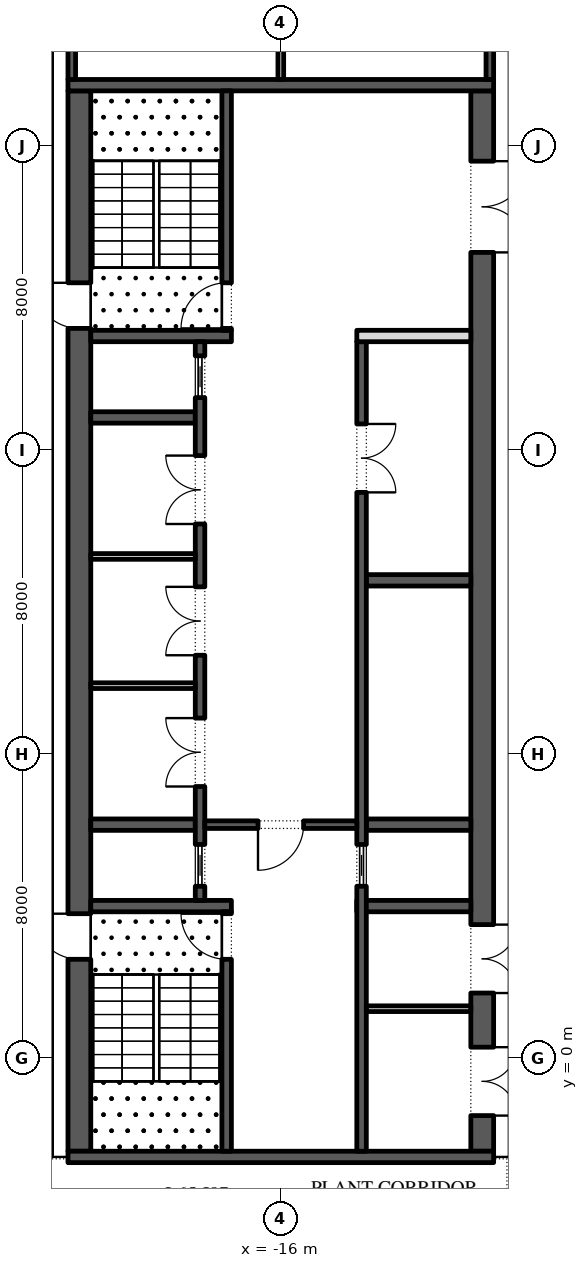
"""IFC4 building model, lengths in metres.
Left out: names, types, materials, properties, quantities, classifications, styles, units other than length and angle.
Written with IfcOpenShell. Run it as: python <this file> out.ifc"""

import sys

from ifc_helpers import new_model, si_unit, direction, frame, frame_2d, origin, place, context, subcontext, project, spatial, rectangle, extrude, element, fill, save


model = new_model("IFC4")
c1 = context("Model", 3, precision=1e-05, world=origin(), true_north=direction((0.0, 1.0)))
c2 = subcontext(c1, "Body", "Model", "MODEL_VIEW")
j1 = project(units=[si_unit("LENGTHUNIT", "METRE"), si_unit("PLANEANGLEUNIT", "RADIAN")], contexts=[c1])
p1 = place(None, origin())
s1 = spatial("IfcSite", under=j1, at=p1, CompositionType="ELEMENT")
p2 = place(p1, origin())
s2 = spatial("IfcBuilding", under=s1, at=p2, CompositionType="ELEMENT")
p3 = place(p2, frame((0.0, 0.0, 297.6)))
s3 = spatial("IfcBuildingStorey", under=s2, at=p3, CompositionType="ELEMENT", Elevation=297.6)
p4 = place(p3, frame((-21.359, 48.678, 0.0), z_axis=(0.0, 0.0, 1.0), x_axis=(-0.224949219336, -0.974370488428, 0.0)))
e1 = element("IfcWall", 1, at=p4, inside=s3, PredefinedType="STANDARD", context=c2, shape_type="SweptSolid", body=[
    extrude(rectangle(XDim=30.011, YDim=0.3, at=frame_2d((15.006, 0.0))), origin(), (0.0, 0.0, 1.0), 4.95),
])
p5 = place(p4, frame((1.607, 0.0, 0.6)))
e2 = element("IfcOpeningElement", 2, at=p5, cuts=e1, PredefinedType="OPENING", context=c2, shape_type="SweptSolid", body=[
    extrude(rectangle(XDim=3.6, YDim=3.9, at=frame_2d((1.8, 1.95))), frame((0.0, 0.16, 0.0), z_axis=(0.0, -1.0, 0.0), x_axis=(1.0, 0.0, 0.0)), (0.0, 0.0, 1.0), 0.32),
])
p6 = place(p4, frame((8.571, 0.0, 0.6)))
e3 = element("IfcOpeningElement", 3, at=p6, cuts=e1, PredefinedType="OPENING", context=c2, shape_type="SweptSolid", body=[
    extrude(rectangle(XDim=3.6, YDim=3.9, at=frame_2d((1.8, 1.95))), frame((0.0, 0.16, 0.0), z_axis=(0.0, -1.0, 0.0), x_axis=(1.0, 0.0, 0.0)), (0.0, 0.0, 1.0), 0.32),
])
p7 = place(p4, frame((15.686, 0.0, 0.6)))
e4 = element("IfcOpeningElement", 4, at=p7, cuts=e1, PredefinedType="OPENING", context=c2, shape_type="SweptSolid", body=[
    extrude(rectangle(XDim=3.6, YDim=3.9, at=frame_2d((1.8, 1.95))), frame((0.0, 0.16, 0.0), z_axis=(0.0, -1.0, 0.0), x_axis=(1.0, 0.0, 0.0)), (0.0, 0.0, 1.0), 0.32),
])
p8 = place(p3, frame((-21.517, 56.35, -0.05), z_axis=(0.0, 0.0, 1.0), x_axis=(-0.224951435492, -0.97436997679, 0.0)))
e5 = element("IfcWall", 5, at=p8, inside=s3, PredefinedType="STANDARD", context=c2, shape_type="SweptSolid", body=[
    extrude(rectangle(XDim=58.769, YDim=0.2, at=frame_2d((29.385, 0.0))), origin(), (0.0, 0.0, 1.0), 1.1),
])
p9 = place(p3, frame((-21.3, -2.45, 0.0), z_axis=(0.0, 0.0, 1.0), x_axis=(0.0, 1.0, 0.0)))
e6 = element("IfcWall", 6, at=p9, inside=s3, PredefinedType="SHEAR", context=c2, shape_type="SweptSolid", body=[
    extrude(rectangle(XDim=27.9, YDim=0.6, at=frame_2d((13.95, 0.0))), origin(), (0.0, 0.0, 1.0), 4.95),
])
p10 = place(p9, frame((5.05, 0.0, 0.0)))
e7 = element("IfcOpeningElement", 7, at=p10, cuts=e6, PredefinedType="OPENING", context=c2, shape_type="SweptSolid", body=[
    extrude(rectangle(XDim=1.2, YDim=2.1, at=frame_2d((0.6, 1.05))), frame((0.0, 0.31, 0.0), z_axis=(0.0, -1.0, 0.0), x_axis=(1.0, 0.0, 0.0)), (0.0, 0.0, 1.0), 0.62),
])
p11 = place(p9, frame((21.65, 0.0, 0.0)))
e8 = element("IfcOpeningElement", 8, at=p11, cuts=e6, PredefinedType="OPENING", context=c2, shape_type="SweptSolid", body=[
    extrude(rectangle(XDim=1.2, YDim=2.1, at=frame_2d((0.6, 1.05))), frame((0.0, 0.31, 0.0), z_axis=(0.0, -1.0, 0.0), x_axis=(1.0, 0.0, 0.0)), (0.0, 0.0, 1.0), 0.62),
])
p12 = place(p3, frame((-10.7, -2.45, 0.0), z_axis=(0.0, 0.0, 1.0), x_axis=(0.0, 1.0, 0.0)))
e9 = element("IfcWall", 9, at=p12, inside=s3, PredefinedType="SHEAR", context=c2, shape_type="SweptSolid", body=[
    extrude(rectangle(XDim=27.9, YDim=0.6, at=frame_2d((13.95, 0.0))), origin(), (0.0, 0.0, 1.0), 4.95),
])
p13 = place(p12, frame((23.65, 0.0, 0.0)))
e10 = element("IfcOpeningElement", 10, at=p13, cuts=e9, PredefinedType="OPENING", context=c2, shape_type="SweptSolid", body=[
    extrude(rectangle(XDim=2.4, YDim=2.1, at=frame_2d((1.2, 1.05))), frame((0.0, 0.31, 0.0), z_axis=(0.0, -1.0, 0.0), x_axis=(1.0, 0.0, 0.0)), (0.0, 0.0, 1.0), 0.62),
])
p14 = place(p12, frame((0.938, 0.0, 0.0)))
e11 = element("IfcOpeningElement", 11, at=p14, cuts=e9, PredefinedType="OPENING", context=c2, shape_type="SweptSolid", body=[
    extrude(rectangle(XDim=1.8, YDim=2.4, at=frame_2d((0.9, 1.2))), frame((0.0, 0.31, 0.0), z_axis=(0.0, -1.0, 0.0), x_axis=(1.0, 0.0, 0.0)), (0.0, 0.0, 1.0), 0.62),
])
p15 = place(p12, frame((4.163, 0.0, 0.0)))
e12 = element("IfcOpeningElement", 12, at=p15, cuts=e9, PredefinedType="OPENING", context=c2, shape_type="SweptSolid", body=[
    extrude(rectangle(XDim=1.8, YDim=2.4, at=frame_2d((0.9, 1.2))), frame((0.0, 0.31, 0.0), z_axis=(0.0, -1.0, 0.0), x_axis=(1.0, 0.0, 0.0)), (0.0, 0.0, 1.0), 0.62),
])
for number, where, z_axis, x_axis in (
    (13, (-21.6, -2.6, 0.0), (0.0, 0.0, 1.0), (1.0, 0.0, 0.0)),
    (14, (-21.6, 25.6, 0.0), (0.0, 0.0, 1.0), (1.0, 0.0, 0.0)),
):
    element("IfcWall", number, at=place(p3, frame(where, z_axis=z_axis, x_axis=x_axis)), inside=s3, PredefinedType="SHEAR", context=c2, shape_type="SweptSolid", body=[
        extrude(rectangle(XDim=11.2, YDim=0.3, at=frame_2d((5.6, 0.0))), origin(), (0.0, 0.0, 1.0), 4.95),
    ])
p16 = place(p3, frame((-21.0, 4.0, 0.0), z_axis=(0.0, 0.0, 1.0), x_axis=(1.0, 0.0, 0.0)))
e15 = element("IfcWall", 15, at=p16, inside=s3, PredefinedType="SHEAR", context=c2, shape_type="SweptSolid", body=[
    extrude(rectangle(XDim=3.7, YDim=0.3, at=frame_2d((1.85, 0.0))), origin(), (0.0, 0.0, 1.0), 4.95),
])
p17 = place(p3, frame((-17.425, -2.45, 0.0), z_axis=(0.0, 0.0, 1.0), x_axis=(0.0, 1.0, 0.0)))
e16 = element("IfcWall", 16, at=p17, inside=s3, PredefinedType="SHEAR", context=c2, shape_type="SweptSolid", body=[
    extrude(rectangle(XDim=6.3, YDim=0.25, at=frame_2d((3.15, 0.0))), origin(), (0.0, 0.0, 1.0), 4.95),
])
p18 = place(p17, frame((5.05, 0.0, 0.0)))
e17 = element("IfcOpeningElement", 17, at=p18, cuts=e16, PredefinedType="OPENING", context=c2, shape_type="SweptSolid", body=[
    extrude(rectangle(XDim=1.2, YDim=2.1, at=frame_2d((0.6, 1.05))), frame((0.0, 0.135, 0.0), z_axis=(0.0, -1.0, 0.0), x_axis=(1.0, 0.0, 0.0)), (0.0, 0.0, 1.0), 0.27),
])
p19 = place(p3, frame((-21.0, 19.0, 0.0), z_axis=(0.0, 0.0, 1.0), x_axis=(1.0, 0.0, 0.0)))
e18 = element("IfcWall", 18, at=p19, inside=s3, PredefinedType="SHEAR", context=c2, shape_type="SweptSolid", body=[
    extrude(rectangle(XDim=3.7, YDim=0.3, at=frame_2d((1.85, 0.0))), origin(), (0.0, 0.0, 1.0), 4.95),
])
p20 = place(p3, frame((-17.425, 19.15, 0.0), z_axis=(0.0, 0.0, 1.0), x_axis=(0.0, 1.0, 0.0)))
e19 = element("IfcWall", 19, at=p20, inside=s3, PredefinedType="SHEAR", context=c2, shape_type="SweptSolid", body=[
    extrude(rectangle(XDim=6.3, YDim=0.25, at=frame_2d((3.15, 0.0))), origin(), (0.0, 0.0, 1.0), 4.95),
])
p21 = place(p20, frame((0.05, 0.0, 0.0)))
e20 = element("IfcOpeningElement", 20, at=p21, cuts=e19, PredefinedType="OPENING", context=c2, shape_type="SweptSolid", body=[
    extrude(rectangle(XDim=1.2, YDim=2.1, at=frame_2d((0.6, 1.05))), frame((0.0, 0.135, 0.0), z_axis=(0.0, -1.0, 0.0), x_axis=(1.0, 0.0, 0.0)), (0.0, 0.0, 1.0), 0.27),
])
for number, where, z_axis, x_axis in (
    (21, (-21.0, 6.143, 0.0), (0.0, 0.0, 1.0), (1.0, 0.0, 0.0)),
    (22, (-21.0, 16.857, 0.0), (0.0, 0.0, 1.0), (1.0, 0.0, 0.0)),
):
    element("IfcWall", number, at=place(p3, frame(where, z_axis=z_axis, x_axis=x_axis)), inside=s3, PredefinedType="SHEAR", context=c2, shape_type="SweptSolid", body=[
        extrude(rectangle(XDim=2.75, YDim=0.3, at=frame_2d((1.375, 0.0))), origin(), (0.0, 0.0, 1.0), 4.95),
    ])
p22 = place(p3, frame((-18.125, 4.15, 0.0), z_axis=(0.0, 0.0, 1.0), x_axis=(0.0, 1.0, 0.0)))
e23 = element("IfcWall", 23, at=p22, inside=s3, PredefinedType="SHEAR", context=c2, shape_type="SweptSolid", body=[
    extrude(rectangle(XDim=14.7, YDim=0.25, at=frame_2d((7.35, 0.0))), origin(), (0.0, 0.0, 1.0), 4.95),
])
p23 = place(p22, frame((2.996, 0.0, 0.0)))
e24 = element("IfcOpeningElement", 24, at=p23, cuts=e23, PredefinedType="OPENING", context=c2, shape_type="SweptSolid", body=[
    extrude(rectangle(XDim=1.8, YDim=2.4, at=frame_2d((0.9, 1.2))), frame((0.0, 0.135, 0.0), z_axis=(0.0, -1.0, 0.0), x_axis=(1.0, 0.0, 0.0)), (0.0, 0.0, 1.0), 0.27),
])
p24 = place(p22, frame((6.45, 0.0, 0.0)))
e25 = element("IfcOpeningElement", 25, at=p24, cuts=e23, PredefinedType="OPENING", context=c2, shape_type="SweptSolid", body=[
    extrude(rectangle(XDim=1.8, YDim=2.4, at=frame_2d((0.9, 1.2))), frame((0.0, 0.135, 0.0), z_axis=(0.0, -1.0, 0.0), x_axis=(1.0, 0.0, 0.0)), (0.0, 0.0, 1.0), 0.27),
])
p25 = place(p22, frame((9.904, 0.0, 0.0)))
e26 = element("IfcOpeningElement", 26, at=p25, cuts=e23, PredefinedType="OPENING", context=c2, shape_type="SweptSolid", body=[
    extrude(rectangle(XDim=1.8, YDim=2.4, at=frame_2d((0.9, 1.2))), frame((0.0, 0.135, 0.0), z_axis=(0.0, -1.0, 0.0), x_axis=(1.0, 0.0, 0.0)), (0.0, 0.0, 1.0), 0.27),
])
p26 = place(p22, frame((0.371, 0.0, 0.0)))
e27 = element("IfcOpeningElement", 27, at=p26, cuts=e23, PredefinedType="OPENING", context=c2, shape_type="SweptSolid", body=[
    extrude(rectangle(XDim=1.1, YDim=2.1, at=frame_2d((0.55, 1.05))), frame((0.0, 0.135, 0.0), z_axis=(0.0, -1.0, 0.0), x_axis=(1.0, 0.0, 0.0)), (0.0, 0.0, 1.0), 0.27),
])
p27 = place(p22, frame((13.229, 0.0, 0.0)))
e28 = element("IfcOpeningElement", 28, at=p27, cuts=e23, PredefinedType="OPENING", context=c2, shape_type="SweptSolid", body=[
    extrude(rectangle(XDim=1.1, YDim=2.1, at=frame_2d((0.55, 1.05))), frame((0.0, 0.135, 0.0), z_axis=(0.0, -1.0, 0.0), x_axis=(1.0, 0.0, 0.0)), (0.0, 0.0, 1.0), 0.27),
])
for number, where, z_axis, x_axis in (
    (29, (-21.0, 9.8, 0.0), (0.0, 0.0, 1.0), (1.0, 0.0, 0.0)),
    (30, (-21.0, 13.2, 0.0), (0.0, 0.0, 1.0), (1.0, 0.0, 0.0)),
):
    element("IfcWall", number, at=place(p3, frame(where, z_axis=z_axis, x_axis=x_axis)), inside=s3, PredefinedType="PARTITIONING", context=c2, shape_type="SweptSolid", body=[
        extrude(rectangle(XDim=2.75, YDim=0.15, at=frame_2d((1.375, 0.0))), origin(), (0.0, 0.0, 1.0), 4.95),
    ])
p28 = place(p3, frame((-14.0, 4.0, 0.0), z_axis=(0.0, 0.0, 1.0), x_axis=(1.0, 0.0, 0.0)))
e31 = element("IfcWall", 31, at=p28, inside=s3, PredefinedType="SHEAR", context=c2, shape_type="SweptSolid", body=[
    extrude(rectangle(XDim=3.0, YDim=0.3, at=frame_2d((1.5, 0.0))), origin(), (0.0, 0.0, 1.0), 4.95),
])
for number, where, z_axis, x_axis in (
    (32, (-13.75, 6.143, 0.0), (0.0, 0.0, 1.0), (1.0, 0.0, 0.0)),
    (33, (-13.75, 12.571, 0.0), (0.0, 0.0, 1.0), (1.0, 0.0, 0.0)),
):
    element("IfcWall", number, at=place(p3, frame(where, z_axis=z_axis, x_axis=x_axis)), inside=s3, PredefinedType="SHEAR", context=c2, shape_type="SweptSolid", body=[
        extrude(rectangle(XDim=2.75, YDim=0.3, at=frame_2d((1.375, 0.0))), origin(), (0.0, 0.0, 1.0), 4.95),
    ])
p29 = place(p3, frame((-13.875, -2.45, 0.0), z_axis=(0.0, 0.0, 1.0), x_axis=(0.0, 1.0, 0.0)))
e34 = element("IfcWall", 34, at=p29, inside=s3, PredefinedType="SHEAR", context=c2, shape_type="SweptSolid", body=[
    extrude(rectangle(XDim=21.3, YDim=0.25, at=frame_2d((10.65, 0.0))), origin(), (0.0, 0.0, 1.0), 4.95),
])
p30 = place(p29, frame((17.336, 0.0, 0.0)))
e35 = element("IfcOpeningElement", 35, at=p30, cuts=e34, PredefinedType="OPENING", context=c2, shape_type="SweptSolid", body=[
    extrude(rectangle(XDim=1.8, YDim=2.4, at=frame_2d((0.9, 1.2))), frame((0.0, 0.135, 0.0), z_axis=(0.0, -1.0, 0.0), x_axis=(1.0, 0.0, 0.0)), (0.0, 0.0, 1.0), 0.27),
])
p31 = place(p29, frame((6.971, 0.0, 0.0)))
e36 = element("IfcOpeningElement", 36, at=p31, cuts=e34, PredefinedType="OPENING", context=c2, shape_type="SweptSolid", body=[
    extrude(rectangle(XDim=1.1, YDim=2.1, at=frame_2d((0.55, 1.05))), frame((0.0, 0.135, 0.0), z_axis=(0.0, -1.0, 0.0), x_axis=(1.0, 0.0, 0.0)), (0.0, 0.0, 1.0), 0.27),
])
p32 = place(p3, frame((-14.0, 19.0, 0.0), z_axis=(0.0, 0.0, 1.0), x_axis=(1.0, 0.0, 0.0)))
e37 = element("IfcWall", 37, at=p32, inside=s3, PredefinedType="PARTITIONING", context=c2, shape_type="SweptSolid", body=[
    extrude(rectangle(XDim=3.0, YDim=0.3, at=frame_2d((1.5, 0.0))), origin(), (0.0, 0.0, 1.0), 4.95),
])
p33 = place(p3, frame((-18.0, 6.143, 0.0), z_axis=(0.0, 0.0, 1.0), x_axis=(1.0, 0.0, 0.0)))
e38 = element("IfcWall", 38, at=p33, inside=s3, PredefinedType="SHEAR", context=c2, shape_type="SweptSolid", body=[
    extrude(rectangle(XDim=4.0, YDim=0.2, at=frame_2d((2.0, 0.0))), origin(), (0.0, 0.0, 1.0), 4.95),
])
p34 = place(p33, frame((1.4, 0.0, 0.0)))
e39 = element("IfcOpeningElement", 39, at=p34, cuts=e38, PredefinedType="OPENING", context=c2, shape_type="SweptSolid", body=[
    extrude(rectangle(XDim=1.2, YDim=2.1, at=frame_2d((0.6, 1.05))), frame((0.0, 0.11, 0.0), z_axis=(0.0, -1.0, 0.0), x_axis=(1.0, 0.0, 0.0)), (0.0, 0.0, 1.0), 0.22),
])
p35 = place(p3, frame((-13.75, 1.3, 0.0), z_axis=(0.0, 0.0, 1.0), x_axis=(1.0, 0.0, 0.0)))
e40 = element("IfcWall", 40, at=p35, inside=s3, PredefinedType="PARTITIONING", context=c2, shape_type="SweptSolid", body=[
    extrude(rectangle(XDim=2.75, YDim=0.15, at=frame_2d((1.375, 0.0))), origin(), (0.0, 0.0, 1.0), 4.95),
])
p36 = place(p3, frame((-21.5, 25.75, 0.0), z_axis=(0.0, 0.0, 1.0), x_axis=(0.0, 1.0, 0.0)))
e41 = element("IfcWall", 41, at=p36, inside=s3, PredefinedType="SHEAR", context=c2, shape_type="SweptSolid", body=[
    extrude(rectangle(XDim=15.05, YDim=0.2, at=frame_2d((7.525, 0.0))), origin(), (0.0, 0.0, 1.0), 4.95),
])
p37 = place(p36, frame((6.625, 0.0, 0.0)))
e42 = element("IfcOpeningElement", 42, at=p37, cuts=e41, PredefinedType="OPENING", context=c2, shape_type="SweptSolid", body=[
    extrude(rectangle(XDim=1.8, YDim=2.4, at=frame_2d((0.9, 1.2))), frame((0.0, 0.11, 0.0), z_axis=(0.0, -1.0, 0.0), x_axis=(1.0, 0.0, 0.0)), (0.0, 0.0, 1.0), 0.22),
])
p38 = place(p3, frame((-10.5, 25.75, 0.0), z_axis=(0.0, 0.0, 1.0), x_axis=(0.0, 1.0, 0.0)))
e43 = element("IfcWall", 43, at=p38, inside=s3, PredefinedType="SHEAR", context=c2, shape_type="SweptSolid", body=[
    extrude(rectangle(XDim=15.05, YDim=0.2, at=frame_2d((7.525, 0.0))), origin(), (0.0, 0.0, 1.0), 4.95),
])
p39 = place(p38, frame((6.625, 0.0, 0.0)))
e44 = element("IfcOpeningElement", 44, at=p39, cuts=e43, PredefinedType="OPENING", context=c2, shape_type="SweptSolid", body=[
    extrude(rectangle(XDim=1.8, YDim=2.4, at=frame_2d((0.9, 1.2))), frame((0.0, 0.11, 0.0), z_axis=(0.0, -1.0, 0.0), x_axis=(1.0, 0.0, 0.0)), (0.0, 0.0, 1.0), 0.22),
])
p40 = place(p3, frame((-16.0, 25.75, 0.0), z_axis=(0.0, 0.0, 1.0), x_axis=(0.0, 1.0, 0.0)))
e45 = element("IfcWall", 45, at=p40, inside=s3, PredefinedType="PARTITIONING", context=c2, shape_type="SweptSolid", body=[
    extrude(rectangle(XDim=15.05, YDim=0.15, at=frame_2d((7.525, 0.0))), origin(), (0.0, 0.0, 1.0), 4.95),
])
p41 = place(p23, origin())
e46 = element("IfcDoor", 46, at=p41, inside=s3, OperationType="DOUBLE_DOOR_SINGLE_SWING", PredefinedType="DOOR", context=c2, shape_type="SweptSolid", body=[
    extrude(rectangle(XDim=1.8, YDim=2.4, at=frame_2d((0.9, 1.2))), frame((0.0, 0.125, 0.0), z_axis=(0.0, -1.0, 0.0), x_axis=(1.0, 0.0, 0.0)), (0.0, 0.0, 1.0), 0.05),
])
fill(e24, e46)
p42 = place(p24, origin())
e47 = element("IfcDoor", 47, at=p42, inside=s3, OperationType="DOUBLE_DOOR_SINGLE_SWING", PredefinedType="DOOR", context=c2, shape_type="SweptSolid", body=[
    extrude(rectangle(XDim=1.8, YDim=2.4, at=frame_2d((0.9, 1.2))), frame((0.0, 0.125, 0.0), z_axis=(0.0, -1.0, 0.0), x_axis=(1.0, 0.0, 0.0)), (0.0, 0.0, 1.0), 0.05),
])
fill(e25, e47)
p43 = place(p25, origin())
e48 = element("IfcDoor", 48, at=p43, inside=s3, OperationType="DOUBLE_DOOR_SINGLE_SWING", PredefinedType="DOOR", context=c2, shape_type="SweptSolid", body=[
    extrude(rectangle(XDim=1.8, YDim=2.4, at=frame_2d((0.9, 1.2))), frame((0.0, 0.125, 0.0), z_axis=(0.0, -1.0, 0.0), x_axis=(1.0, 0.0, 0.0)), (0.0, 0.0, 1.0), 0.05),
])
fill(e26, e48)
p44 = place(p26, origin())
e49 = element("IfcDoor", 49, at=p44, inside=s3, OperationType="SLIDING_TO_LEFT", PredefinedType="DOOR", context=c2, shape_type="SweptSolid", body=[
    extrude(rectangle(XDim=1.1, YDim=2.1, at=frame_2d((0.55, 1.05))), frame((0.0, 0.025, 0.0), z_axis=(0.0, -1.0, 0.0), x_axis=(1.0, 0.0, 0.0)), (0.0, 0.0, 1.0), 0.05),
])
fill(e27, e49)
p45 = place(p27, origin())
e50 = element("IfcDoor", 50, at=p45, inside=s3, OperationType="SLIDING_TO_LEFT", PredefinedType="DOOR", context=c2, shape_type="SweptSolid", body=[
    extrude(rectangle(XDim=1.1, YDim=2.1, at=frame_2d((0.55, 1.05))), frame((0.0, 0.025, 0.0), z_axis=(0.0, -1.0, 0.0), x_axis=(1.0, 0.0, 0.0)), (0.0, 0.0, 1.0), 0.05),
])
fill(e28, e50)
p46 = place(p30, frame((1.8, -0.2, 0.0), z_axis=(0.0, 0.0, 1.0), x_axis=(-1.0, 0.0, 0.0)))
e51 = element("IfcDoor", 51, at=p46, inside=s3, OperationType="DOUBLE_DOOR_SINGLE_SWING", PredefinedType="DOOR", context=c2, shape_type="SweptSolid", body=[
    extrude(rectangle(XDim=1.8, YDim=2.4, at=frame_2d((0.9, 1.2))), frame((0.0, -0.075, 0.0), z_axis=(0.0, -1.0, 0.0), x_axis=(1.0, 0.0, 0.0)), (0.0, 0.0, 1.0), 0.05),
])
fill(e35, e51)
p47 = place(p31, origin())
e52 = element("IfcDoor", 52, at=p47, inside=s3, OperationType="SLIDING_TO_LEFT", PredefinedType="DOOR", context=c2, shape_type="SweptSolid", body=[
    extrude(rectangle(XDim=1.1, YDim=2.1, at=frame_2d((0.55, 1.05))), frame((0.0, 0.025, 0.0), z_axis=(0.0, -1.0, 0.0), x_axis=(1.0, 0.0, 0.0)), (0.0, 0.0, 1.0), 0.05),
])
fill(e36, e52)
p48 = place(p34, frame((1.2, 0.0, 0.0), z_axis=(0.0, 0.0, 1.0), x_axis=(-1.0, 0.0, 0.0)))
e53 = element("IfcDoor", 53, at=p48, inside=s3, OperationType="SINGLE_SWING_LEFT", PredefinedType="DOOR", context=c2, shape_type="SweptSolid", body=[
    extrude(rectangle(XDim=1.2, YDim=2.1, at=frame_2d((0.6, 1.05))), frame((0.0, 0.025, 0.0), z_axis=(0.0, -1.0, 0.0), x_axis=(1.0, 0.0, 0.0)), (0.0, 0.0, 1.0), 0.05),
])
fill(e39, e53)
p49 = place(p13, frame((2.4, 0.0, 0.0), z_axis=(0.0, 0.0, 1.0), x_axis=(-1.0, 0.0, 0.0)))
e54 = element("IfcDoor", 54, at=p49, inside=s3, OperationType="DOUBLE_DOOR_SINGLE_SWING", PredefinedType="DOOR", context=c2, shape_type="SweptSolid", body=[
    extrude(rectangle(XDim=2.4, YDim=2.1, at=frame_2d((1.2, 1.05))), frame((0.0, 0.025, 0.0), z_axis=(0.0, -1.0, 0.0), x_axis=(1.0, 0.0, 0.0)), (0.0, 0.0, 1.0), 0.05),
])
fill(e10, e54)
p50 = place(p18, origin())
e55 = element("IfcDoor", 55, at=p50, inside=s3, OperationType="SINGLE_SWING_LEFT", PredefinedType="DOOR", context=c2, shape_type="SweptSolid", body=[
    extrude(rectangle(XDim=1.2, YDim=2.1, at=frame_2d((0.6, 1.05))), frame((0.0, 0.025, 0.0), z_axis=(0.0, -1.0, 0.0), x_axis=(1.0, 0.0, 0.0)), (0.0, 0.0, 1.0), 0.05),
])
fill(e17, e55)
p51 = place(p10, origin())
e56 = element("IfcDoor", 56, at=p51, inside=s3, OperationType="SINGLE_SWING_LEFT", PredefinedType="DOOR", context=c2, shape_type="SweptSolid", body=[
    extrude(rectangle(XDim=1.2, YDim=2.1, at=frame_2d((0.6, 1.05))), frame((0.0, 0.025, 0.0), z_axis=(0.0, -1.0, 0.0), x_axis=(1.0, 0.0, 0.0)), (0.0, 0.0, 1.0), 0.05),
])
fill(e7, e56)
p52 = place(p21, origin())
e57 = element("IfcDoor", 57, at=p52, inside=s3, OperationType="SINGLE_SWING_RIGHT", PredefinedType="DOOR", context=c2, shape_type="SweptSolid", body=[
    extrude(rectangle(XDim=1.2, YDim=2.1, at=frame_2d((0.6, 1.05))), frame((0.0, 0.025, 0.0), z_axis=(0.0, -1.0, 0.0), x_axis=(1.0, 0.0, 0.0)), (0.0, 0.0, 1.0), 0.05),
])
fill(e20, e57)
p53 = place(p11, origin())
e58 = element("IfcDoor", 58, at=p53, inside=s3, OperationType="SINGLE_SWING_LEFT", PredefinedType="DOOR", context=c2, shape_type="SweptSolid", body=[
    extrude(rectangle(XDim=1.2, YDim=2.1, at=frame_2d((0.6, 1.05))), frame((0.0, 0.025, 0.0), z_axis=(0.0, -1.0, 0.0), x_axis=(1.0, 0.0, 0.0)), (0.0, 0.0, 1.0), 0.05),
])
fill(e8, e58)
p54 = place(p14, frame((1.8, 0.55, 0.0), z_axis=(0.0, 0.0, 1.0), x_axis=(-1.0, 0.0, 0.0)))
e59 = element("IfcDoor", 59, at=p54, inside=s3, OperationType="DOUBLE_DOOR_SINGLE_SWING", PredefinedType="DOOR", context=c2, shape_type="SweptSolid", body=[
    extrude(rectangle(XDim=1.8, YDim=2.4, at=frame_2d((0.9, 1.2))), frame((0.0, 0.3, 0.0), z_axis=(0.0, -1.0, 0.0), x_axis=(1.0, 0.0, 0.0)), (0.0, 0.0, 1.0), 0.05),
])
fill(e11, e59)
p55 = place(p15, frame((1.8, 0.55, 0.0), z_axis=(0.0, 0.0, 1.0), x_axis=(-1.0, 0.0, 0.0)))
e60 = element("IfcDoor", 60, at=p55, inside=s3, OperationType="DOUBLE_DOOR_SINGLE_SWING", PredefinedType="DOOR", context=c2, shape_type="SweptSolid", body=[
    extrude(rectangle(XDim=1.8, YDim=2.4, at=frame_2d((0.9, 1.2))), frame((0.0, 0.3, 0.0), z_axis=(0.0, -1.0, 0.0), x_axis=(1.0, 0.0, 0.0)), (0.0, 0.0, 1.0), 0.05),
])
fill(e12, e60)
save(model, sys.argv[1])
